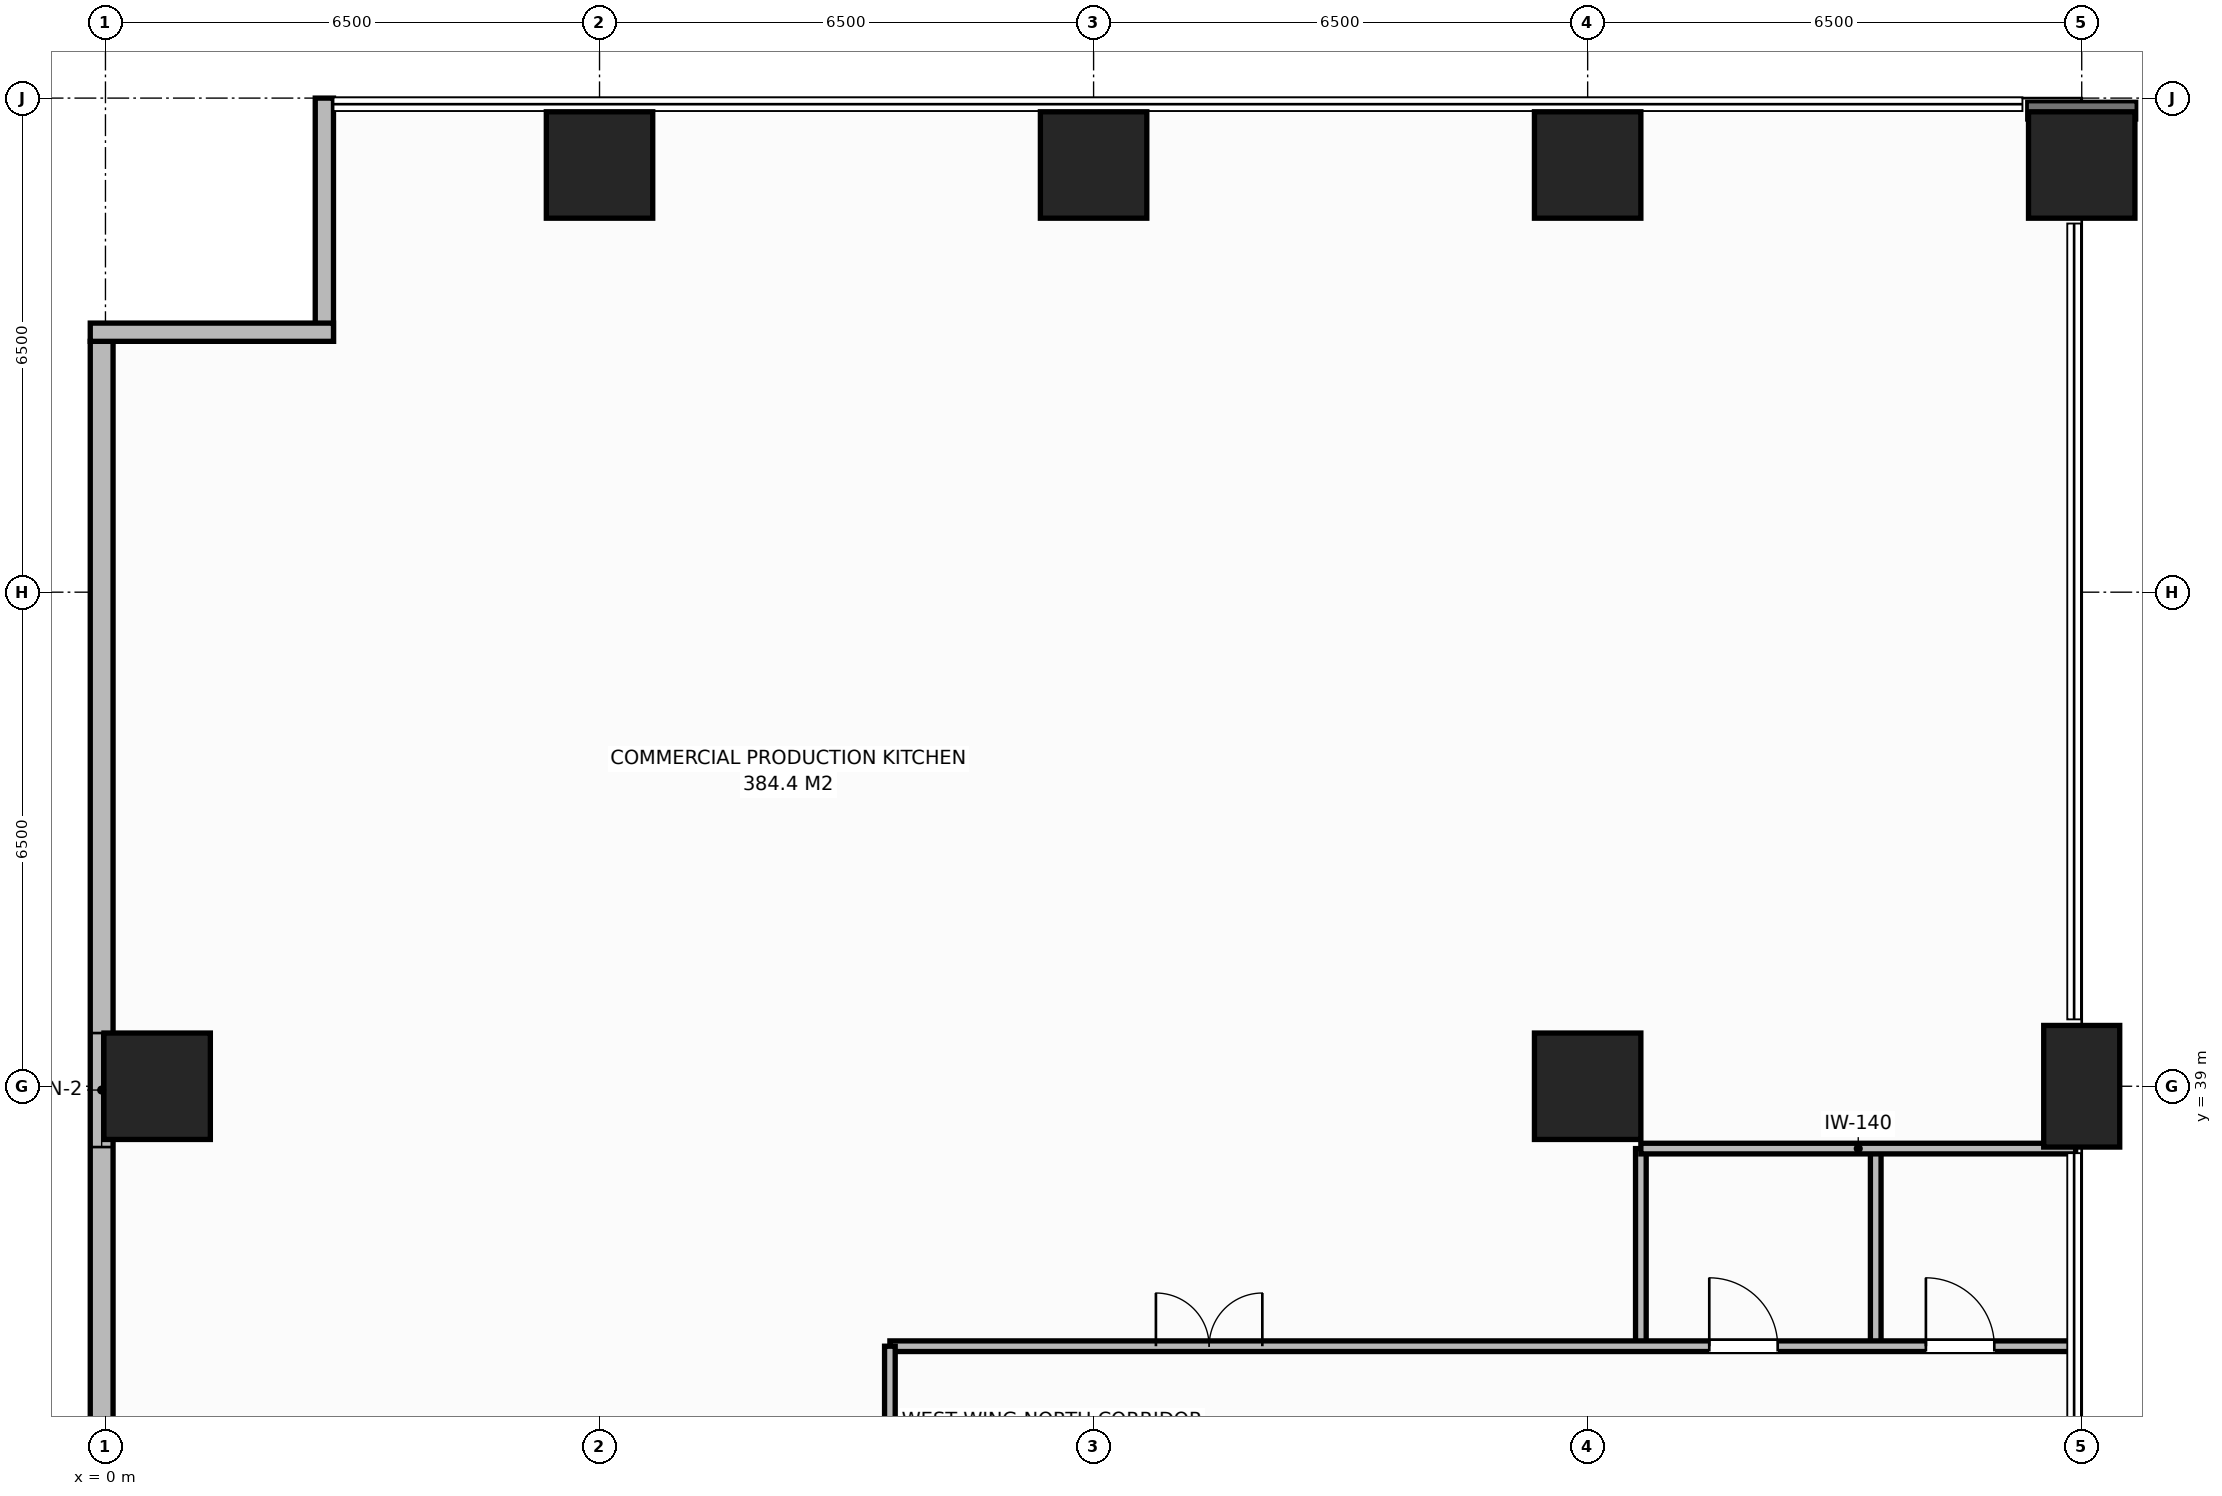
"""IFC4 building model, lengths in metres.
Left out: names, types, materials, properties, quantities, classifications, styles, units other than length and angle.
Written with IfcOpenShell. Run it as: python <this file> out.ifc"""

import sys

from ifc_helpers import new_model, si_unit, direction, frame, frame_2d, origin, origin_2d, place, context, subcontext, project, spatial, rectangle, extrude, element, fill, save


model = new_model("IFC4")
c1 = context("Model", 3, precision=1e-05, world=origin(), true_north=direction((0.0, 1.0)))
c2 = subcontext(c1, "Body", "Model", "MODEL_VIEW")
j1 = project(units=[si_unit("LENGTHUNIT", "METRE"), si_unit("PLANEANGLEUNIT", "RADIAN")], contexts=[c1])
p1 = place(None, origin())
s1 = spatial("IfcSite", under=j1, at=p1, CompositionType="ELEMENT")
p2 = place(p1, origin())
s2 = spatial("IfcBuilding", under=s1, at=p2, CompositionType="ELEMENT")
p3 = place(p2, frame((0.0, 0.0, 17.0)))
s3 = spatial("IfcBuildingStorey", under=s2, at=p3, CompositionType="ELEMENT", Elevation=17.0)
p4 = place(p3, frame((19.5, 39.0, 0.0), z_axis=(0.0, 0.0, 1.0), x_axis=(1.0, 0.0, 0.0)))
e1 = element("IfcColumn", 1, at=p4, inside=s3, PredefinedType="COLUMN", context=c2, shape_type="SweptSolid", body=[
    extrude(rectangle(XDim=1.4, YDim=1.4, at=origin_2d()), origin(), (0.0, 0.0, 1.0), 5.0),
])
p5 = place(p3, frame((26.0, 39.0, 0.0), z_axis=(0.0, 0.0, 1.0), x_axis=(1.0, 0.0, 0.0)))
e2 = element("IfcColumn", 2, at=p5, inside=s3, PredefinedType="PILASTER", context=c2, shape_type="SweptSolid", body=[
    extrude(rectangle(XDim=1.0, YDim=1.6, at=origin_2d()), origin(), (0.0, 0.0, 1.0), 5.0),
])
for number, where, z_axis, x_axis in (
    (3, (6.5, 51.12, 0.0), (0.0, 0.0, 1.0), (1.0, 0.0, 0.0)),
    (4, (13.0, 51.12, 0.0), (0.0, 0.0, 1.0), (1.0, 0.0, 0.0)),
    (5, (19.5, 51.12, 0.0), (0.0, 0.0, 1.0), (1.0, 0.0, 0.0)),
    (6, (26.0, 51.12, 0.0), (0.0, 0.0, 1.0), (1.0, 0.0, 0.0)),
    (7, (0.68, 39.0, 0.0), (0.0, 0.0, 1.0), (1.0, 0.0, 0.0)),
):
    element("IfcColumn", number, at=place(p3, frame(where, z_axis=z_axis, x_axis=x_axis)), inside=s3, PredefinedType="COLUMN", context=c2, shape_type="SweptSolid", body=[
        extrude(rectangle(XDim=1.4, YDim=1.4, at=origin_2d()), origin(), (0.0, 0.0, 1.0), 5.0),
    ])
p6 = place(p3, frame((-0.05, 3.2, 0.0), z_axis=(0.0, 0.0, 1.0), x_axis=(0.0, 1.0, 0.0)))
e8 = element("IfcWall", 8, at=p6, inside=s3, PredefinedType="STANDARD", context=c2, shape_type="SweptSolid", body=[
    extrude(rectangle(XDim=45.6, YDim=0.3, at=frame_2d((22.8, 0.0))), origin(), (0.0, 0.0, 1.0), 4.4),
])
p7 = place(p6, frame((5.0, 0.0, 0.9)))
e9 = element("IfcOpeningElement", 9, at=p7, cuts=e8, PredefinedType="OPENING", context=c2, shape_type="SweptSolid", body=[
    extrude(rectangle(XDim=1.5, YDim=2.2, at=frame_2d((0.75, 1.1))), frame((0.0, 0.16, 0.0), z_axis=(0.0, -1.0, 0.0), x_axis=(1.0, 0.0, 0.0)), (0.0, 0.0, 1.0), 0.32),
])
p8 = place(p6, frame((14.5, 0.0, 0.9)))
e10 = element("IfcOpeningElement", 10, at=p8, cuts=e8, PredefinedType="OPENING", context=c2, shape_type="SweptSolid", body=[
    extrude(rectangle(XDim=1.5, YDim=2.2, at=frame_2d((0.75, 1.1))), frame((0.0, 0.16, 0.0), z_axis=(0.0, -1.0, 0.0), x_axis=(1.0, 0.0, 0.0)), (0.0, 0.0, 1.0), 0.32),
])
p9 = place(p6, frame((25.5, 0.0, 0.9)))
e11 = element("IfcOpeningElement", 11, at=p9, cuts=e8, PredefinedType="OPENING", context=c2, shape_type="SweptSolid", body=[
    extrude(rectangle(XDim=1.5, YDim=2.2, at=frame_2d((0.75, 1.1))), frame((0.0, 0.16, 0.0), z_axis=(0.0, -1.0, 0.0), x_axis=(1.0, 0.0, 0.0)), (0.0, 0.0, 1.0), 0.32),
])
p10 = place(p6, frame((35.0, 0.0, 0.9)))
e12 = element("IfcOpeningElement", 12, at=p10, cuts=e8, PredefinedType="OPENING", context=c2, shape_type="SweptSolid", body=[
    extrude(rectangle(XDim=1.5, YDim=2.2, at=frame_2d((0.75, 1.1))), frame((0.0, 0.16, 0.0), z_axis=(0.0, -1.0, 0.0), x_axis=(1.0, 0.0, 0.0)), (0.0, 0.0, 1.0), 0.32),
])
for number, where, z_axis, x_axis in (
    (13, (2.88, 48.8, 0.0), (0.0, 0.0, 1.0), (0.0, 1.0, 0.0)),
    (14, (-0.2, 48.92, 0.0), (0.0, 0.0, 1.0), (1.0, 0.0, 0.0)),
):
    element("IfcWall", number, at=place(p3, frame(where, z_axis=z_axis, x_axis=x_axis)), inside=s3, PredefinedType="STANDARD", context=c2, shape_type="SweptSolid", body=[
        extrude(rectangle(XDim=3.2, YDim=0.24, at=frame_2d((1.6, 0.0))), origin(), (0.0, 0.0, 1.0), 4.4),
    ])
for number, where, z_axis, x_axis in (
    (15, (20.2, 35.58, 0.0), (0.0, 0.0, 1.0), (0.0, 1.0, 0.0)),
    (16, (23.29, 35.58, 0.0), (0.0, 0.0, 1.0), (0.0, 1.0, 0.0)),
):
    element("IfcWall", number, at=place(p3, frame(where, z_axis=z_axis, x_axis=x_axis)), inside=s3, PredefinedType="PARTITIONING", context=c2, shape_type="SweptSolid", body=[
        extrude(rectangle(XDim=2.6, YDim=0.14, at=frame_2d((1.3, 0.0))), origin(), (0.0, 0.0, 1.0), 4.4),
    ])
p11 = place(p3, frame((20.2, 38.18, 0.0), z_axis=(0.0, 0.0, 1.0), x_axis=(1.0, 0.0, 0.0)))
e17 = element("IfcWall", 17, at=p11, inside=s3, PredefinedType="PARTITIONING", context=c2, shape_type="SweptSolid", body=[
    extrude(rectangle(XDim=5.72, YDim=0.14, at=frame_2d((2.86, 0.0))), origin(), (0.0, 0.0, 1.0), 4.4),
])
p12 = place(p3, frame((10.32, 35.58, 0.0), z_axis=(0.0, 0.0, 1.0), x_axis=(1.0, 0.0, 0.0)))
e18 = element("IfcWall", 18, at=p12, inside=s3, PredefinedType="PARTITIONING", context=c2, shape_type="SweptSolid", body=[
    extrude(rectangle(XDim=15.6, YDim=0.14, at=frame_2d((7.8, 0.0))), origin(), (0.0, 0.0, 1.0), 4.4),
])
p13 = place(p12, frame((10.78, 0.0, 0.0)))
e19 = element("IfcOpeningElement", 19, at=p13, cuts=e18, PredefinedType="OPENING", context=c2, shape_type="SweptSolid", body=[
    extrude(rectangle(XDim=0.9, YDim=2.15, at=frame_2d((0.45, 1.075))), frame((0.0, 0.08, 0.0), z_axis=(0.0, -1.0, 0.0), x_axis=(1.0, 0.0, 0.0)), (0.0, 0.0, 1.0), 0.16),
])
p14 = place(p12, frame((13.63, 0.0, 0.0)))
e20 = element("IfcOpeningElement", 20, at=p14, cuts=e18, PredefinedType="OPENING", context=c2, shape_type="SweptSolid", body=[
    extrude(rectangle(XDim=0.9, YDim=2.15, at=frame_2d((0.45, 1.075))), frame((0.0, 0.08, 0.0), z_axis=(0.0, -1.0, 0.0), x_axis=(1.0, 0.0, 0.0)), (0.0, 0.0, 1.0), 0.16),
])
p15 = place(p12, frame((3.5, 0.0, 0.0)))
e21 = element("IfcOpeningElement", 21, at=p15, cuts=e18, PredefinedType="OPENING", context=c2, shape_type="SweptSolid", body=[
    extrude(rectangle(XDim=1.4, YDim=2.2, at=frame_2d((0.7, 1.1))), frame((0.0, 0.08, 0.0), z_axis=(0.0, -1.0, 0.0), x_axis=(1.0, 0.0, 0.0)), (0.0, 0.0, 1.0), 0.16),
])
p16 = place(p3, frame((10.32, 18.6, 0.0), z_axis=(0.0, 0.0, 1.0), x_axis=(0.0, 1.0, 0.0)))
e22 = element("IfcWall", 22, at=p16, inside=s3, PredefinedType="PARTITIONING", context=c2, shape_type="SweptSolid", body=[
    extrude(rectangle(XDim=16.98, YDim=0.14, at=frame_2d((8.49, 0.0))), origin(), (0.0, 0.0, 1.0), 4.4),
])
p17 = place(p16, frame((4.0, 0.0, 0.0)))
e23 = element("IfcOpeningElement", 23, at=p17, cuts=e22, PredefinedType="OPENING", context=c2, shape_type="SweptSolid", body=[
    extrude(rectangle(XDim=1.4, YDim=2.2, at=frame_2d((0.7, 1.1))), frame((0.0, 0.08, 0.0), z_axis=(0.0, -1.0, 0.0), x_axis=(1.0, 0.0, 0.0)), (0.0, 0.0, 1.0), 0.16),
])
p18 = place(p10, origin())
e24 = element("IfcWindow", 24, at=p18, inside=s3, PartitioningType="SINGLE_PANEL", PredefinedType="WINDOW", context=c2, shape_type="SweptSolid", body=[
    extrude(rectangle(XDim=1.5, YDim=2.2, at=frame_2d((0.75, 1.1))), frame((0.0, 0.03, 0.0), z_axis=(0.0, -1.0, 0.0), x_axis=(1.0, 0.0, 0.0)), (0.0, 0.0, 1.0), 0.06),
])
fill(e12, e24)
p19 = place(p13, origin())
e25 = element("IfcDoor", 25, at=p19, inside=s3, OperationType="SINGLE_SWING_LEFT", PredefinedType="DOOR", context=c2, shape_type="SweptSolid", body=[
    extrude(rectangle(XDim=0.9, YDim=2.15, at=frame_2d((0.45, 1.075))), frame((0.0, 0.025, 0.0), z_axis=(0.0, -1.0, 0.0), x_axis=(1.0, 0.0, 0.0)), (0.0, 0.0, 1.0), 0.05),
])
fill(e19, e25)
p20 = place(p14, origin())
e26 = element("IfcDoor", 26, at=p20, inside=s3, OperationType="SINGLE_SWING_LEFT", PredefinedType="DOOR", context=c2, shape_type="SweptSolid", body=[
    extrude(rectangle(XDim=0.9, YDim=2.15, at=frame_2d((0.45, 1.075))), frame((0.0, 0.025, 0.0), z_axis=(0.0, -1.0, 0.0), x_axis=(1.0, 0.0, 0.0)), (0.0, 0.0, 1.0), 0.05),
])
fill(e20, e26)
p21 = place(p15, origin())
e27 = element("IfcDoor", 27, at=p21, inside=s3, OperationType="DOUBLE_DOOR_SINGLE_SWING", PredefinedType="DOOR", context=c2, shape_type="SweptSolid", body=[
    extrude(rectangle(XDim=1.4, YDim=2.2, at=frame_2d((0.7, 1.1))), frame((0.0, 0.025, 0.0), z_axis=(0.0, -1.0, 0.0), x_axis=(1.0, 0.0, 0.0)), (0.0, 0.0, 1.0), 0.05),
])
fill(e21, e27)
save(model, sys.argv[1])
